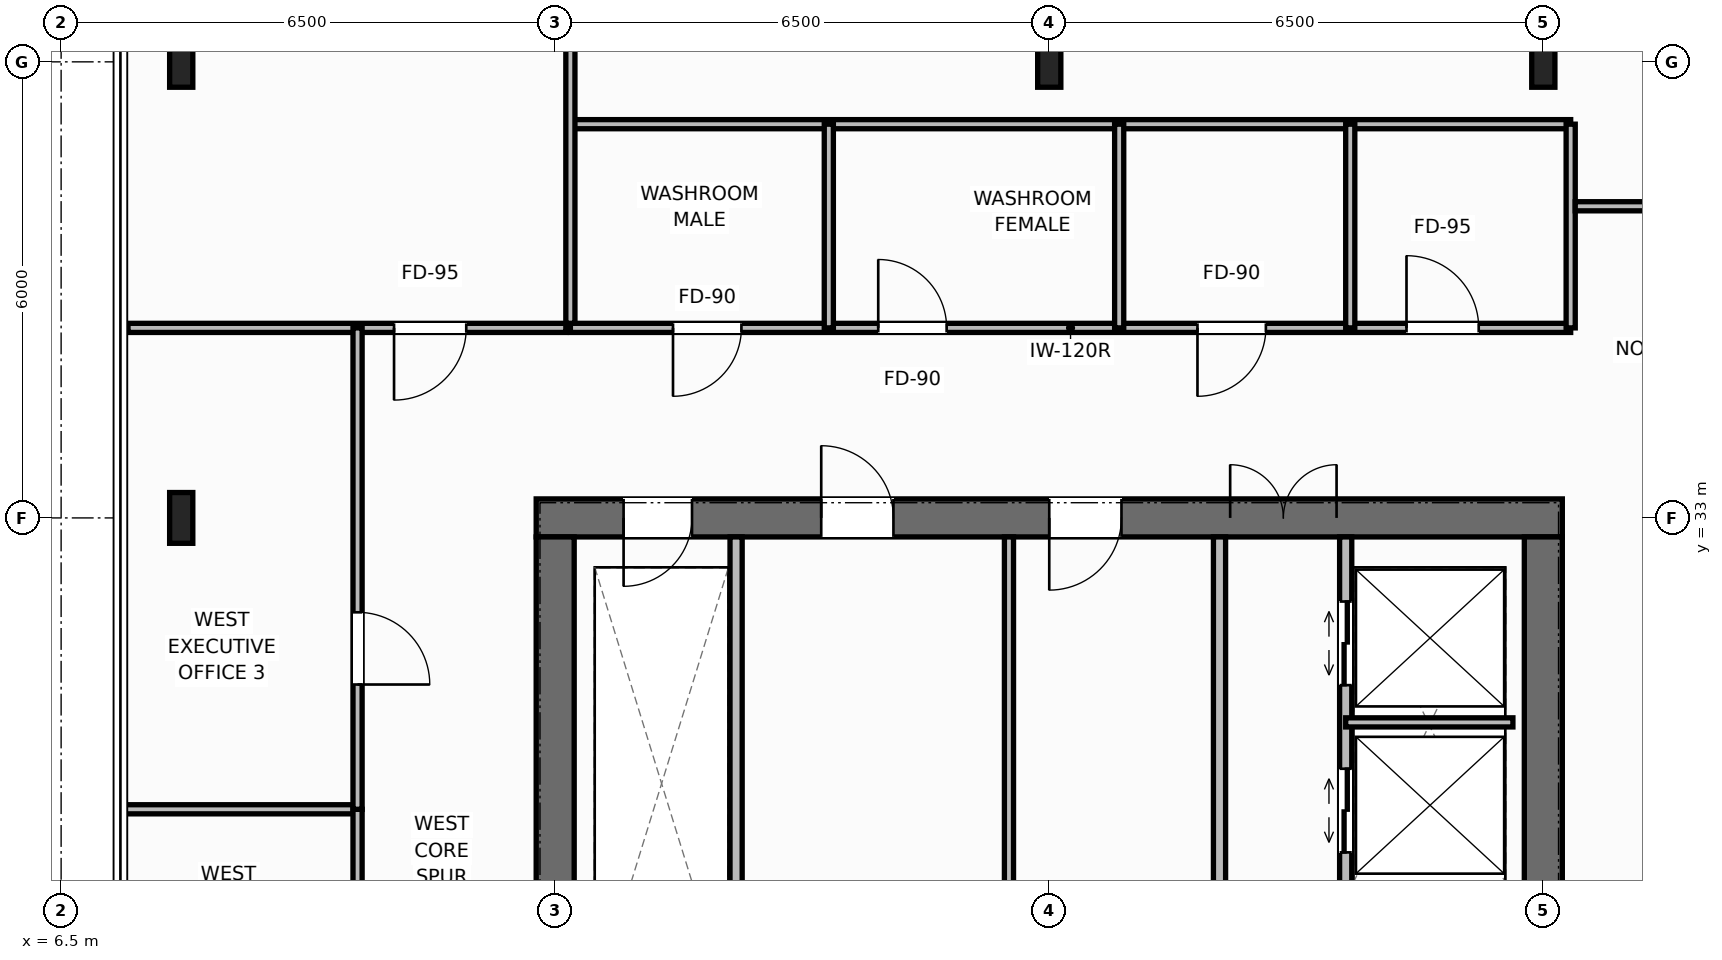
"""IFC4 building model, lengths in metres.
Left out: names, types, materials, properties, quantities, classifications, styles, units other than length and angle.
Written with IfcOpenShell. Run it as: python <this file> out.ifc"""

import sys

from ifc_helpers import new_model, si_unit, direction, frame, frame_2d, origin, origin_2d, place, context, subcontext, project, spatial, rectangle, i_section, extrude, element, fill, save


model = new_model("IFC4")
c1 = context("Model", 3, precision=1e-05, world=origin(), true_north=direction((0.0, 1.0)))
c2 = subcontext(c1, "Body", "Model", "MODEL_VIEW")
j1 = project(units=[si_unit("LENGTHUNIT", "METRE"), si_unit("PLANEANGLEUNIT", "RADIAN")], contexts=[c1])
p1 = place(None, origin())
s1 = spatial("IfcSite", under=j1, at=p1, CompositionType="ELEMENT")
p2 = place(p1, origin())
s2 = spatial("IfcBuilding", under=s1, at=p2, CompositionType="ELEMENT")
p3 = place(p2, frame((0.0, 0.0, 259.4)))
s3 = spatial("IfcBuildingStorey", under=s2, at=p3, CompositionType="ELEMENT", Elevation=259.4)
p4 = place(p3, frame((12.75, 33.0, 0.0), z_axis=(0.0, 0.0, 1.0), x_axis=(1.0, 0.0, 0.0)))
e1 = element("IfcWall", 1, at=p4, inside=s3, PredefinedType="SHEAR", context=c2, shape_type="SweptSolid", body=[
    extrude(rectangle(XDim=13.5, YDim=0.5, at=frame_2d((6.75, 0.0))), origin(), (0.0, 0.0, 1.0), 3.8),
])
p5 = place(p4, frame((1.15, 0.0, 0.0)))
e2 = element("IfcOpeningElement", 2, at=p5, cuts=e1, PredefinedType="OPENING", context=c2, shape_type="SweptSolid", body=[
    extrude(rectangle(XDim=0.9, YDim=2.15, at=frame_2d((0.45, 1.075))), frame((0.0, 0.26, 0.0), z_axis=(0.0, -1.0, 0.0), x_axis=(1.0, 0.0, 0.0)), (0.0, 0.0, 1.0), 0.52),
])
p6 = place(p4, frame((3.75, 0.0, 0.0)))
e3 = element("IfcOpeningElement", 3, at=p6, cuts=e1, PredefinedType="OPENING", context=c2, shape_type="SweptSolid", body=[
    extrude(rectangle(XDim=0.95, YDim=2.15, at=frame_2d((0.475, 1.075))), frame((0.0, 0.26, 0.0), z_axis=(0.0, -1.0, 0.0), x_axis=(1.0, 0.0, 0.0)), (0.0, 0.0, 1.0), 0.52),
])
p7 = place(p4, frame((6.75, 0.0, 0.0)))
e4 = element("IfcOpeningElement", 4, at=p7, cuts=e1, PredefinedType="OPENING", context=c2, shape_type="SweptSolid", body=[
    extrude(rectangle(XDim=0.95, YDim=2.15, at=frame_2d((0.475, 1.075))), frame((0.0, 0.26, 0.0), z_axis=(0.0, -1.0, 0.0), x_axis=(1.0, 0.0, 0.0)), (0.0, 0.0, 1.0), 0.52),
])
p8 = place(p4, frame((9.13, 0.0, 0.0)))
e5 = element("IfcOpeningElement", 5, at=p8, cuts=e1, PredefinedType="OPENING", context=c2, shape_type="SweptSolid", body=[
    extrude(rectangle(XDim=1.4, YDim=2.2, at=frame_2d((0.7, 1.1))), frame((0.0, 0.26, 0.0), z_axis=(0.0, -1.0, 0.0), x_axis=(1.0, 0.0, 0.0)), (0.0, 0.0, 1.0), 0.52),
])
p9 = place(p3, frame((13.0, 19.25, 0.0), z_axis=(0.0, 0.0, 1.0), x_axis=(0.0, 1.0, 0.0)))
e6 = element("IfcWall", 6, at=p9, inside=s3, PredefinedType="SHEAR", context=c2, shape_type="SweptSolid", body=[
    extrude(rectangle(XDim=13.5, YDim=0.5, at=frame_2d((6.75, 0.0))), origin(), (0.0, 0.0, 1.0), 3.8),
])
p10 = place(p9, frame((4.8, 0.0, 0.0)))
e7 = element("IfcOpeningElement", 7, at=p10, cuts=e6, PredefinedType="OPENING", context=c2, shape_type="SweptSolid", body=[
    extrude(rectangle(XDim=1.4, YDim=2.2, at=frame_2d((0.7, 1.1))), frame((0.0, 0.26, 0.0), z_axis=(0.0, -1.0, 0.0), x_axis=(1.0, 0.0, 0.0)), (0.0, 0.0, 1.0), 0.52),
])
p11 = place(p3, frame((26.0, 19.25, 0.0), z_axis=(0.0, 0.0, 1.0), x_axis=(0.0, 1.0, 0.0)))
e8 = element("IfcWall", 8, at=p11, inside=s3, PredefinedType="SHEAR", context=c2, shape_type="SweptSolid", body=[
    extrude(rectangle(XDim=13.5, YDim=0.5, at=frame_2d((6.75, 0.0))), origin(), (0.0, 0.0, 1.0), 3.8),
])
for number, where, z_axis, x_axis in (
    (9, (19.5, 39.0, 0.0), (0.0, 0.0, 1.0), (1.0, 0.0, 0.0)),
    (10, (26.0, 39.0, 0.0), (0.0, 0.0, 1.0), (1.0, 0.0, 0.0)),
    (11, (8.08, 33.0, 0.0), (0.0, 0.0, 1.0), (1.0, 0.0, 0.0)),
    (12, (8.08, 39.0, 0.0), (0.0, 0.0, 1.0), (1.0, 0.0, 0.0)),
):
    element("IfcColumn", number, at=place(p3, frame(where, z_axis=z_axis, x_axis=x_axis)), inside=s3, PredefinedType="COLUMN", context=c2, shape_type="SweptSolid", body=[
        extrude(i_section(OverallWidth=0.305, OverallDepth=0.668, WebThickness=0.021, FlangeThickness=0.04, at=origin_2d()), origin(), (0.0, 0.0, 1.0), 3.8),
    ])
p12 = place(p3, frame((15.38, 26.56, 0.0), z_axis=(0.0, 0.0, 1.0), x_axis=(0.0, 1.0, 0.0)))
e13 = element("IfcWall", 13, at=p12, inside=s3, PredefinedType="STANDARD", context=c2, shape_type="SweptSolid", body=[
    extrude(rectangle(XDim=6.19, YDim=0.16, at=frame_2d((3.095, 0.0))), origin(), (0.0, 0.0, 1.0), 3.588),
])
p13 = place(p3, frame((18.97, 26.56, 0.0), z_axis=(0.0, 0.0, 1.0), x_axis=(0.0, 1.0, 0.0)))
e14 = element("IfcWall", 14, at=p13, inside=s3, PredefinedType="PARTITIONING", context=c2, shape_type="SweptSolid", body=[
    extrude(rectangle(XDim=6.19, YDim=0.12, at=frame_2d((3.095, 0.0))), origin(), (0.0, 0.0, 1.0), 3.588),
])
p14 = place(p3, frame((21.74, 26.56, 0.0), z_axis=(0.0, 0.0, 1.0), x_axis=(0.0, 1.0, 0.0)))
e15 = element("IfcWall", 15, at=p14, inside=s3, PredefinedType="STANDARD", context=c2, shape_type="SweptSolid", body=[
    extrude(rectangle(XDim=6.19, YDim=0.16, at=frame_2d((3.095, 0.0))), origin(), (0.0, 0.0, 1.0), 3.588),
])
p15 = place(p3, frame((23.4, 19.25, 0.0), z_axis=(0.0, 0.0, 1.0), x_axis=(0.0, 1.0, 0.0)))
e16 = element("IfcWall", 16, at=p15, inside=s3, PredefinedType="STANDARD", context=c2, shape_type="SweptSolid", body=[
    extrude(rectangle(XDim=13.5, YDim=0.16, at=frame_2d((6.75, 0.0))), origin(), (0.0, 0.0, 1.0), 3.588),
])
p16 = place(p15, frame((2.25, 0.0, 0.0)))
e17 = element("IfcOpeningElement", 17, at=p16, cuts=e16, PredefinedType="OPENING", context=c2, shape_type="SweptSolid", body=[
    extrude(rectangle(XDim=0.95, YDim=2.15, at=frame_2d((0.475, 1.075))), frame((0.0, 0.09, 0.0), z_axis=(0.0, -1.0, 0.0), x_axis=(1.0, 0.0, 0.0)), (0.0, 0.0, 1.0), 0.18),
])
p17 = place(p15, frame((6.35, 0.0, 0.0)))
e18 = element("IfcOpeningElement", 18, at=p17, cuts=e16, PredefinedType="OPENING", context=c2, shape_type="SweptSolid", body=[
    extrude(rectangle(XDim=0.95, YDim=2.15, at=frame_2d((0.475, 1.075))), frame((0.0, 0.09, 0.0), z_axis=(0.0, -1.0, 0.0), x_axis=(1.0, 0.0, 0.0)), (0.0, 0.0, 1.0), 0.18),
])
p18 = place(p15, frame((9.35, 0.0, 0.0)))
e19 = element("IfcOpeningElement", 19, at=p18, cuts=e16, PredefinedType="OPENING", context=c2, shape_type="SweptSolid", body=[
    extrude(rectangle(XDim=1.1, YDim=2.2, at=frame_2d((0.55, 1.1))), frame((0.0, 0.09, 0.0), z_axis=(0.0, -1.0, 0.0), x_axis=(1.0, 0.0, 0.0)), (0.0, 0.0, 1.0), 0.18),
])
p19 = place(p15, frame((11.55, 0.0, 0.0)))
e20 = element("IfcOpeningElement", 20, at=p19, cuts=e16, PredefinedType="OPENING", context=c2, shape_type="SweptSolid", body=[
    extrude(rectangle(XDim=1.1, YDim=2.2, at=frame_2d((0.55, 1.1))), frame((0.0, 0.09, 0.0), z_axis=(0.0, -1.0, 0.0), x_axis=(1.0, 0.0, 0.0)), (0.0, 0.0, 1.0), 0.18),
])
p20 = place(p3, frame((23.4, 30.31, 0.0), z_axis=(0.0, 0.0, 1.0), x_axis=(1.0, 0.0, 0.0)))
e21 = element("IfcWall", 21, at=p20, inside=s3, PredefinedType="PARTITIONING", context=c2, shape_type="SweptSolid", body=[
    extrude(rectangle(XDim=2.2, YDim=0.12, at=frame_2d((1.1, 0.0))), origin(), (0.0, 0.0, 1.0), 3.588),
])
p21 = place(p3, frame((13.2, 35.5, 0.0), z_axis=(0.0, 0.0, 1.0), x_axis=(1.0, 0.0, 0.0)))
e22 = element("IfcWall", 22, at=p21, inside=s3, PredefinedType="PARTITIONING", context=c2, shape_type="SweptSolid", body=[
    extrude(rectangle(XDim=13.16, YDim=0.12, at=frame_2d((6.58, 0.0))), origin(), (0.0, 0.0, 1.0), 3.588),
])
p22 = place(p21, frame((1.35, 0.0, 0.0)))
e23 = element("IfcOpeningElement", 23, at=p22, cuts=e22, PredefinedType="OPENING", context=c2, shape_type="SweptSolid", body=[
    extrude(rectangle(XDim=0.9, YDim=2.15, at=frame_2d((0.45, 1.075))), frame((0.0, 0.07, 0.0), z_axis=(0.0, -1.0, 0.0), x_axis=(1.0, 0.0, 0.0)), (0.0, 0.0, 1.0), 0.14),
])
p23 = place(p21, frame((4.05, 0.0, 0.0)))
e24 = element("IfcOpeningElement", 24, at=p23, cuts=e22, PredefinedType="OPENING", context=c2, shape_type="SweptSolid", body=[
    extrude(rectangle(XDim=0.9, YDim=2.15, at=frame_2d((0.45, 1.075))), frame((0.0, 0.07, 0.0), z_axis=(0.0, -1.0, 0.0), x_axis=(1.0, 0.0, 0.0)), (0.0, 0.0, 1.0), 0.14),
])
p24 = place(p21, frame((8.25, 0.0, 0.0)))
e25 = element("IfcOpeningElement", 25, at=p24, cuts=e22, PredefinedType="OPENING", context=c2, shape_type="SweptSolid", body=[
    extrude(rectangle(XDim=0.9, YDim=2.15, at=frame_2d((0.45, 1.075))), frame((0.0, 0.07, 0.0), z_axis=(0.0, -1.0, 0.0), x_axis=(1.0, 0.0, 0.0)), (0.0, 0.0, 1.0), 0.14),
])
p25 = place(p21, frame((11.0, 0.0, 0.0)))
e26 = element("IfcOpeningElement", 26, at=p25, cuts=e22, PredefinedType="OPENING", context=c2, shape_type="SweptSolid", body=[
    extrude(rectangle(XDim=0.95, YDim=2.15, at=frame_2d((0.475, 1.075))), frame((0.0, 0.07, 0.0), z_axis=(0.0, -1.0, 0.0), x_axis=(1.0, 0.0, 0.0)), (0.0, 0.0, 1.0), 0.14),
])
p26 = place(p3, frame((13.2, 38.18, 0.0), z_axis=(0.0, 0.0, 1.0), x_axis=(1.0, 0.0, 0.0)))
e27 = element("IfcWall", 27, at=p26, inside=s3, PredefinedType="PARTITIONING", context=c2, shape_type="SweptSolid", body=[
    extrude(rectangle(XDim=13.16, YDim=0.12, at=frame_2d((6.58, 0.0))), origin(), (0.0, 0.0, 1.0), 3.588),
])
for number, where, z_axis, x_axis in (
    (28, (16.6, 35.5, 0.0), (0.0, 0.0, 1.0), (0.0, 1.0, 0.0)),
    (29, (20.42, 35.5, 0.0), (0.0, 0.0, 1.0), (0.0, 1.0, 0.0)),
    (30, (23.46, 35.5, 0.0), (0.0, 0.0, 1.0), (0.0, 1.0, 0.0)),
    (31, (26.36, 35.5, 0.0), (0.0, 0.0, 1.0), (0.0, 1.0, 0.0)),
):
    element("IfcWall", number, at=place(p3, frame(where, z_axis=z_axis, x_axis=x_axis)), inside=s3, PredefinedType="PARTITIONING", context=c2, shape_type="SweptSolid", body=[
        extrude(rectangle(XDim=2.68, YDim=0.12, at=frame_2d((1.34, 0.0))), origin(), (0.0, 0.0, 1.0), 3.588),
    ])
p27 = place(p3, frame((13.2, 35.56, 0.0), z_axis=(0.0, 0.0, 1.0), x_axis=(0.0, 1.0, 0.0)))
e32 = element("IfcWall", 32, at=p27, inside=s3, PredefinedType="PARTITIONING", context=c2, shape_type="SweptSolid", body=[
    extrude(rectangle(XDim=11.32, YDim=0.12, at=frame_2d((5.66, 0.0))), origin(), (0.0, 0.0, 1.0), 2.788),
])
p28 = place(p3, frame((7.38, 35.5, 0.0), z_axis=(0.0, 0.0, 1.0), x_axis=(1.0, 0.0, 0.0)))
e33 = element("IfcWall", 33, at=p28, inside=s3, PredefinedType="PARTITIONING", context=c2, shape_type="SweptSolid", body=[
    extrude(rectangle(XDim=5.76, YDim=0.12, at=frame_2d((2.88, 0.0))), origin(), (0.0, 0.0, 1.0), 3.588),
])
p29 = place(p28, frame((3.5, 0.0, 0.0)))
e34 = element("IfcOpeningElement", 34, at=p29, cuts=e33, PredefinedType="OPENING", context=c2, shape_type="SweptSolid", body=[
    extrude(rectangle(XDim=0.95, YDim=2.15, at=frame_2d((0.475, 1.075))), frame((0.0, 0.07, 0.0), z_axis=(0.0, -1.0, 0.0), x_axis=(1.0, 0.0, 0.0)), (0.0, 0.0, 1.0), 0.14),
])
p30 = place(p3, frame((26.42, 37.1, 0.0), z_axis=(0.0, 0.0, 1.0), x_axis=(1.0, 0.0, 0.0)))
e35 = element("IfcWall", 35, at=p30, inside=s3, PredefinedType="PARTITIONING", context=c2, shape_type="SweptSolid", body=[
    extrude(rectangle(XDim=9.32, YDim=0.12, at=frame_2d((4.66, 0.0))), origin(), (0.0, 0.0, 1.0), 3.588),
])
p31 = place(p30, frame((4.185, 0.0, 0.0)))
e36 = element("IfcOpeningElement", 36, at=p31, cuts=e35, PredefinedType="OPENING", context=c2, shape_type="SweptSolid", body=[
    extrude(rectangle(XDim=0.95, YDim=2.15, at=frame_2d((0.475, 1.075))), frame((0.0, 0.07, 0.0), z_axis=(0.0, -1.0, 0.0), x_axis=(1.0, 0.0, 0.0)), (0.0, 0.0, 1.0), 0.14),
])
p32 = place(p3, frame((7.22, 29.167, 0.0), z_axis=(0.0, 0.0, 1.0), x_axis=(1.0, 0.0, 0.0)))
e37 = element("IfcWall", 37, at=p32, inside=s3, PredefinedType="PARTITIONING", context=c2, shape_type="SweptSolid", body=[
    extrude(rectangle(XDim=3.18, YDim=0.12, at=frame_2d((1.59, 0.0))), origin(), (0.0, 0.0, 1.0), 3.588),
])
p33 = place(p3, frame((10.4, 22.833, 0.0), z_axis=(0.0, 0.0, 1.0), x_axis=(0.0, 1.0, 0.0)))
e38 = element("IfcWall", 38, at=p33, inside=s3, PredefinedType="PARTITIONING", context=c2, shape_type="SweptSolid", body=[
    extrude(rectangle(XDim=6.333, YDim=0.12, at=frame_2d((3.167, 0.0))), origin(), (0.0, 0.0, 1.0), 3.588),
])
p34 = place(p33, frame((2.692, 0.0, 0.0)))
e39 = element("IfcOpeningElement", 39, at=p34, cuts=e38, PredefinedType="OPENING", context=c2, shape_type="SweptSolid", body=[
    extrude(rectangle(XDim=0.95, YDim=2.15, at=frame_2d((0.475, 1.075))), frame((0.0, 0.07, 0.0), z_axis=(0.0, -1.0, 0.0), x_axis=(1.0, 0.0, 0.0)), (0.0, 0.0, 1.0), 0.14),
])
p35 = place(p3, frame((10.4, 29.167, 0.0), z_axis=(0.0, 0.0, 1.0), x_axis=(0.0, 1.0, 0.0)))
e40 = element("IfcWall", 40, at=p35, inside=s3, PredefinedType="PARTITIONING", context=c2, shape_type="SweptSolid", body=[
    extrude(rectangle(XDim=6.333, YDim=0.12, at=frame_2d((3.167, 0.0))), origin(), (0.0, 0.0, 1.0), 3.588),
])
p36 = place(p35, frame((1.642, 0.0, 0.0)))
e41 = element("IfcOpeningElement", 41, at=p36, cuts=e40, PredefinedType="OPENING", context=c2, shape_type="SweptSolid", body=[
    extrude(rectangle(XDim=0.95, YDim=2.15, at=frame_2d((0.475, 1.075))), frame((0.0, 0.07, 0.0), z_axis=(0.0, -1.0, 0.0), x_axis=(1.0, 0.0, 0.0)), (0.0, 0.0, 1.0), 0.14),
])
p37 = place(p5, origin())
e42 = element("IfcDoor", 42, at=p37, inside=s3, OperationType="SINGLE_SWING_RIGHT", PredefinedType="DOOR", context=c2, shape_type="SweptSolid", body=[
    extrude(rectangle(XDim=0.9, YDim=2.15, at=frame_2d((0.45, 1.075))), frame((0.0, -0.025, 0.0), z_axis=(0.0, -1.0, 0.0), x_axis=(1.0, 0.0, 0.0)), (0.0, 0.0, 1.0), 0.05),
])
fill(e2, e42)
p38 = place(p6, origin())
e43 = element("IfcDoor", 43, at=p38, inside=s3, OperationType="SINGLE_SWING_LEFT", PredefinedType="DOOR", context=c2, shape_type="SweptSolid", body=[
    extrude(rectangle(XDim=0.95, YDim=2.15, at=frame_2d((0.475, 1.075))), frame((0.0, -0.025, 0.0), z_axis=(0.0, -1.0, 0.0), x_axis=(1.0, 0.0, 0.0)), (0.0, 0.0, 1.0), 0.05),
])
fill(e3, e43)
p39 = place(p7, origin())
e44 = element("IfcDoor", 44, at=p39, inside=s3, OperationType="SINGLE_SWING_RIGHT", PredefinedType="DOOR", context=c2, shape_type="SweptSolid", body=[
    extrude(rectangle(XDim=0.95, YDim=2.15, at=frame_2d((0.475, 1.075))), frame((0.0, -0.025, 0.0), z_axis=(0.0, -1.0, 0.0), x_axis=(1.0, 0.0, 0.0)), (0.0, 0.0, 1.0), 0.05),
])
fill(e4, e44)
p40 = place(p8, origin())
e45 = element("IfcDoor", 45, at=p40, inside=s3, OperationType="DOUBLE_DOOR_SINGLE_SWING", PredefinedType="DOOR", context=c2, shape_type="SweptSolid", body=[
    extrude(rectangle(XDim=1.4, YDim=2.2, at=frame_2d((0.7, 1.1))), frame((0.0, -0.025, 0.0), z_axis=(0.0, -1.0, 0.0), x_axis=(1.0, 0.0, 0.0)), (0.0, 0.0, 1.0), 0.05),
])
fill(e5, e45)
p41 = place(p18, origin())
e46 = element("IfcDoor", 46, at=p41, inside=s3, OperationType="DOUBLE_DOOR_SLIDING", PredefinedType="DOOR", context=c2, shape_type="SweptSolid", body=[
    extrude(rectangle(XDim=1.1, YDim=2.2, at=frame_2d((0.55, 1.1))), frame((0.0, 0.025, 0.0), z_axis=(0.0, -1.0, 0.0), x_axis=(1.0, 0.0, 0.0)), (0.0, 0.0, 1.0), 0.05),
])
fill(e19, e46)
p42 = place(p19, origin())
e47 = element("IfcDoor", 47, at=p42, inside=s3, OperationType="DOUBLE_DOOR_SLIDING", PredefinedType="DOOR", context=c2, shape_type="SweptSolid", body=[
    extrude(rectangle(XDim=1.1, YDim=2.2, at=frame_2d((0.55, 1.1))), frame((0.0, 0.025, 0.0), z_axis=(0.0, -1.0, 0.0), x_axis=(1.0, 0.0, 0.0)), (0.0, 0.0, 1.0), 0.05),
])
fill(e20, e47)
p43 = place(p22, origin())
e48 = element("IfcDoor", 48, at=p43, inside=s3, OperationType="SINGLE_SWING_RIGHT", PredefinedType="DOOR", context=c2, shape_type="SweptSolid", body=[
    extrude(rectangle(XDim=0.9, YDim=2.15, at=frame_2d((0.45, 1.075))), frame((0.0, 0.025, 0.0), z_axis=(0.0, -1.0, 0.0), x_axis=(1.0, 0.0, 0.0)), (0.0, 0.0, 1.0), 0.05),
])
fill(e23, e48)
p44 = place(p23, origin())
e49 = element("IfcDoor", 49, at=p44, inside=s3, OperationType="SINGLE_SWING_LEFT", PredefinedType="DOOR", context=c2, shape_type="SweptSolid", body=[
    extrude(rectangle(XDim=0.9, YDim=2.15, at=frame_2d((0.45, 1.075))), frame((0.0, 0.025, 0.0), z_axis=(0.0, -1.0, 0.0), x_axis=(1.0, 0.0, 0.0)), (0.0, 0.0, 1.0), 0.05),
])
fill(e24, e49)
p45 = place(p24, origin())
e50 = element("IfcDoor", 50, at=p45, inside=s3, OperationType="SINGLE_SWING_RIGHT", PredefinedType="DOOR", context=c2, shape_type="SweptSolid", body=[
    extrude(rectangle(XDim=0.9, YDim=2.15, at=frame_2d((0.45, 1.075))), frame((0.0, 0.025, 0.0), z_axis=(0.0, -1.0, 0.0), x_axis=(1.0, 0.0, 0.0)), (0.0, 0.0, 1.0), 0.05),
])
fill(e25, e50)
p46 = place(p25, origin())
e51 = element("IfcDoor", 51, at=p46, inside=s3, OperationType="SINGLE_SWING_LEFT", PredefinedType="DOOR", context=c2, shape_type="SweptSolid", body=[
    extrude(rectangle(XDim=0.95, YDim=2.15, at=frame_2d((0.475, 1.075))), frame((0.0, 0.025, 0.0), z_axis=(0.0, -1.0, 0.0), x_axis=(1.0, 0.0, 0.0)), (0.0, 0.0, 1.0), 0.05),
])
fill(e26, e51)
p47 = place(p29, origin())
e52 = element("IfcDoor", 52, at=p47, inside=s3, OperationType="SINGLE_SWING_RIGHT", PredefinedType="DOOR", context=c2, shape_type="SweptSolid", body=[
    extrude(rectangle(XDim=0.95, YDim=2.15, at=frame_2d((0.475, 1.075))), frame((0.0, 0.025, 0.0), z_axis=(0.0, -1.0, 0.0), x_axis=(1.0, 0.0, 0.0)), (0.0, 0.0, 1.0), 0.05),
])
fill(e34, e52)
p48 = place(p36, origin())
e53 = element("IfcDoor", 53, at=p48, inside=s3, OperationType="SINGLE_SWING_RIGHT", PredefinedType="DOOR", context=c2, shape_type="SweptSolid", body=[
    extrude(rectangle(XDim=0.95, YDim=2.15, at=frame_2d((0.475, 1.075))), frame((0.0, 0.025, 0.0), z_axis=(0.0, -1.0, 0.0), x_axis=(1.0, 0.0, 0.0)), (0.0, 0.0, 1.0), 0.05),
])
fill(e41, e53)
save(model, sys.argv[1])
